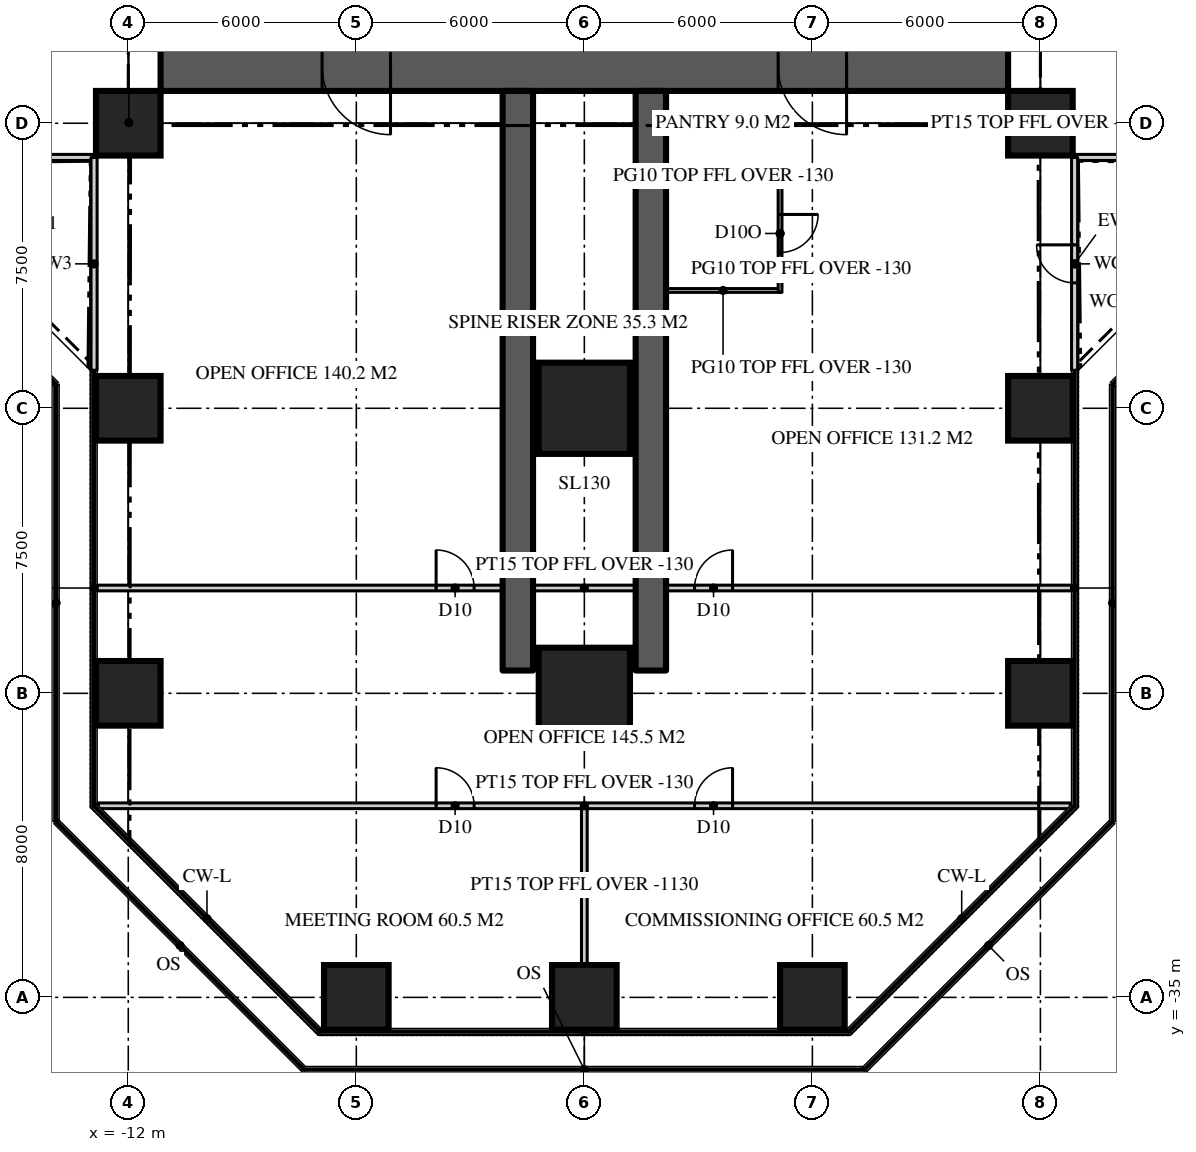
"""IFC4 building model, lengths in metres.
Left out: names, types, materials, properties, quantities, classifications, styles, units other than length and angle.
Written with IfcOpenShell. Run it as: python <this file> out.ifc"""

import sys

from ifc_helpers import new_model, si_unit, direction, frame, frame_2d, origin, origin_2d, place, context, subcontext, project, spatial, rectangle, extrude, element, fill, save


model = new_model("IFC4")
c1 = context("Model", 3, precision=1e-05, world=origin(), true_north=direction((0.0, 1.0)))
c2 = subcontext(c1, "Body", "Model", "MODEL_VIEW")
j1 = project(units=[si_unit("LENGTHUNIT", "METRE"), si_unit("PLANEANGLEUNIT", "RADIAN")], contexts=[c1])
p1 = place(None, origin())
s1 = spatial("IfcSite", under=j1, at=p1, CompositionType="ELEMENT")
p2 = place(p1, origin())
s2 = spatial("IfcBuilding", under=s1, at=p2, CompositionType="ELEMENT")
p3 = place(p2, frame((0.0, 0.0, 82.5)))
s3 = spatial("IfcBuildingStorey", under=s2, at=p3, CompositionType="ELEMENT", Elevation=82.5)
p4 = place(p3, frame((11.15, -10.5, 0.0), z_axis=(0.0, 0.0, 1.0), x_axis=(-1.0, 0.0, 0.0)))
e1 = element("IfcWall", 1, at=p4, inside=s3, PredefinedType="SHEAR", context=c2, shape_type="SweptSolid", body=[
    extrude(rectangle(XDim=22.3, YDim=1.3, at=frame_2d((11.15, 0.0))), origin(), (0.0, 0.0, 1.0), 3.9),
])
p5 = place(p4, frame((16.25, 0.0, 0.0)))
e2 = element("IfcOpeningElement", 2, at=p5, cuts=e1, PredefinedType="OPENING", context=c2, shape_type="SweptSolid", body=[
    extrude(rectangle(XDim=1.8, YDim=2.2, at=frame_2d((0.9, 1.1))), frame((0.0, 0.66, 0.0), z_axis=(0.0, -1.0, 0.0), x_axis=(1.0, 0.0, 0.0)), (0.0, 0.0, 1.0), 1.32),
])
p6 = place(p4, frame((4.25, 0.0, 0.0)))
e3 = element("IfcOpeningElement", 3, at=p6, cuts=e1, PredefinedType="OPENING", context=c2, shape_type="SweptSolid", body=[
    extrude(rectangle(XDim=1.8, YDim=2.2, at=frame_2d((0.9, 1.1))), frame((0.0, 0.66, 0.0), z_axis=(0.0, -1.0, 0.0), x_axis=(1.0, 0.0, 0.0)), (0.0, 0.0, 1.0), 1.32),
])
for number, where, z_axis, x_axis in (
    (4, (-1.75, -11.15, 0.0), (0.0, 0.0, 1.0), (0.0, -1.0, 0.0)),
    (5, (1.75, -11.15, 0.0), (0.0, 0.0, 1.0), (0.0, -1.0, 0.0)),
):
    element("IfcWall", number, at=place(p3, frame(where, z_axis=z_axis, x_axis=x_axis)), inside=s3, PredefinedType="SHEAR", context=c2, shape_type="SweptSolid", body=[
        extrude(rectangle(XDim=15.25, YDim=0.8, at=frame_2d((7.625, 0.0))), origin(), (0.0, 0.0, 1.0), 3.9),
    ])
for number, where, z_axis, x_axis in (
    (6, (-6.0, -35.0, 0.0), (0.0, 0.0, 1.0), (1.0, 0.0, 0.0)),
    (7, (0.0, -35.0, 0.0), (0.0, 0.0, 1.0), (1.0, 0.0, 0.0)),
    (8, (6.0, -35.0, 0.0), (0.0, 0.0, 1.0), (1.0, 0.0, 0.0)),
    (9, (-12.0, -27.0, 0.0), (0.0, 0.0, 1.0), (1.0, 0.0, 0.0)),
):
    element("IfcColumn", number, at=place(p3, frame(where, z_axis=z_axis, x_axis=x_axis)), inside=s3, PredefinedType="COLUMN", context=c2, shape_type="SweptSolid", body=[
        extrude(rectangle(XDim=1.7, YDim=1.7, at=origin_2d()), origin(), (0.0, 0.0, 1.0), 3.9),
    ])
p7 = place(p3, frame((0.0, -27.0, 0.0), z_axis=(0.0, 0.0, 1.0), x_axis=(1.0, 0.0, 0.0)))
e10 = element("IfcColumn", 10, at=p7, inside=s3, PredefinedType="COLUMN", context=c2, shape_type="SweptSolid", body=[
    extrude(rectangle(XDim=2.4, YDim=2.4, at=origin_2d()), origin(), (0.0, 0.0, 1.0), 3.9),
])
for number, where, z_axis, x_axis in (
    (11, (12.0, -27.0, 0.0), (0.0, 0.0, 1.0), (1.0, 0.0, 0.0)),
    (12, (-12.0, -19.5, 0.0), (0.0, 0.0, 1.0), (1.0, 0.0, 0.0)),
):
    element("IfcColumn", number, at=place(p3, frame(where, z_axis=z_axis, x_axis=x_axis)), inside=s3, PredefinedType="COLUMN", context=c2, shape_type="SweptSolid", body=[
        extrude(rectangle(XDim=1.7, YDim=1.7, at=origin_2d()), origin(), (0.0, 0.0, 1.0), 3.9),
    ])
p8 = place(p3, frame((0.0, -19.5, 0.0), z_axis=(0.0, 0.0, 1.0), x_axis=(1.0, 0.0, 0.0)))
e13 = element("IfcColumn", 13, at=p8, inside=s3, PredefinedType="COLUMN", context=c2, shape_type="SweptSolid", body=[
    extrude(rectangle(XDim=2.4, YDim=2.4, at=origin_2d()), origin(), (0.0, 0.0, 1.0), 3.9),
])
for number, where, z_axis, x_axis in (
    (14, (12.0, -19.5, 0.0), (0.0, 0.0, 1.0), (1.0, 0.0, 0.0)),
    (15, (-12.0, -12.0, 0.0), (0.0, 0.0, 1.0), (1.0, 0.0, 0.0)),
    (16, (12.0, -12.0, 0.0), (0.0, 0.0, 1.0), (1.0, 0.0, 0.0)),
):
    element("IfcColumn", number, at=place(p3, frame(where, z_axis=z_axis, x_axis=x_axis)), inside=s3, PredefinedType="COLUMN", context=c2, shape_type="SweptSolid", body=[
        extrude(rectangle(XDim=1.7, YDim=1.7, at=origin_2d()), origin(), (0.0, 0.0, 1.0), 3.9),
    ])
p9 = place(p3, frame((12.9, -12.9, 0.0), z_axis=(0.0, 0.0, 1.0), x_axis=(1.0, 0.0, 0.0)))
e17 = element("IfcWall", 17, at=p9, inside=s3, PredefinedType="SOLIDWALL", context=c2, shape_type="SweptSolid", body=[
    extrude(rectangle(XDim=5.6, YDim=0.16, at=frame_2d((2.8, 0.0))), origin(), (0.0, 0.0, 1.0), 3.77),
])
p10 = place(p3, frame((-18.5, -12.9, 0.0), z_axis=(0.0, 0.0, 1.0), x_axis=(1.0, 0.0, 0.0)))
e18 = element("IfcWall", 18, at=p10, inside=s3, PredefinedType="SOLIDWALL", context=c2, shape_type="SweptSolid", body=[
    extrude(rectangle(XDim=5.6, YDim=0.16, at=frame_2d((2.8, 0.0))), origin(), (0.0, 0.0, 1.0), 3.77),
])
p11 = place(p10, frame((2.3, 0.0, 0.0)))
e19 = element("IfcOpeningElement", 19, at=p11, cuts=e18, PredefinedType="OPENING", context=c2, shape_type="SweptSolid", body=[
    extrude(rectangle(XDim=1.0, YDim=2.2, at=frame_2d((0.5, 1.1))), frame((0.0, 0.09, 0.0), z_axis=(0.0, -1.0, 0.0), x_axis=(1.0, 0.0, 0.0)), (0.0, 0.0, 1.0), 0.18),
])
p12 = place(p3, frame((-12.9, -12.9, 0.0), z_axis=(0.0, 0.0, 1.0), x_axis=(0.0, -1.0, 0.0)))
e20 = element("IfcWall", 20, at=p12, inside=s3, PredefinedType="SOLIDWALL", context=c2, shape_type="SweptSolid", body=[
    extrude(rectangle(XDim=5.6, YDim=0.16, at=frame_2d((2.8, 0.0))), origin(), (0.0, 0.0, 1.0), 3.77),
])
p13 = place(p3, frame((12.9, -18.5, 0.0), z_axis=(0.0, 0.0, 1.0), x_axis=(0.0, 1.0, 0.0)))
e21 = element("IfcWall", 21, at=p13, inside=s3, PredefinedType="SOLIDWALL", context=c2, shape_type="SweptSolid", body=[
    extrude(rectangle(XDim=5.6, YDim=0.16, at=frame_2d((2.8, 0.0))), origin(), (0.0, 0.0, 1.0), 3.77),
])
p14 = place(p13, frame((2.3, 0.0, 0.0)))
e22 = element("IfcOpeningElement", 22, at=p14, cuts=e21, PredefinedType="OPENING", context=c2, shape_type="SweptSolid", body=[
    extrude(rectangle(XDim=1.0, YDim=2.2, at=frame_2d((0.5, 1.1))), frame((0.0, 0.09, 0.0), z_axis=(0.0, -1.0, 0.0), x_axis=(1.0, 0.0, 0.0)), (0.0, 0.0, 1.0), 0.18),
])
p15 = place(p3, frame((-12.82, -24.229, 0.0), z_axis=(0.0, 0.0, 1.0), x_axis=(1.0, 0.0, 0.0)))
e23 = element("IfcWall", 23, at=p15, inside=s3, PredefinedType="PARTITIONING", context=c2, shape_type="SweptSolid", body=[
    extrude(rectangle(XDim=25.64, YDim=0.15, at=frame_2d((12.82, 0.0))), origin(), (0.0, 0.0, 1.0), 3.77),
])
p16 = place(p15, frame((15.72, 0.0, 0.0)))
e24 = element("IfcOpeningElement", 24, at=p16, cuts=e23, PredefinedType="OPENING", context=c2, shape_type="SweptSolid", body=[
    extrude(rectangle(XDim=1.0, YDim=2.2, at=frame_2d((0.5, 1.1))), frame((0.0, 0.085, 0.0), z_axis=(0.0, -1.0, 0.0), x_axis=(1.0, 0.0, 0.0)), (0.0, 0.0, 1.0), 0.17),
])
p17 = place(p15, frame((8.92, 0.0, 0.0)))
e25 = element("IfcOpeningElement", 25, at=p17, cuts=e23, PredefinedType="OPENING", context=c2, shape_type="SweptSolid", body=[
    extrude(rectangle(XDim=1.0, YDim=2.2, at=frame_2d((0.5, 1.1))), frame((0.0, 0.085, 0.0), z_axis=(0.0, -1.0, 0.0), x_axis=(1.0, 0.0, 0.0)), (0.0, 0.0, 1.0), 0.17),
])
p18 = place(p3, frame((-12.786, -29.959, 0.0), z_axis=(0.0, 0.0, 1.0), x_axis=(1.0, 0.0, 0.0)))
e26 = element("IfcWall", 26, at=p18, inside=s3, PredefinedType="PARTITIONING", context=c2, shape_type="SweptSolid", body=[
    extrude(rectangle(XDim=25.573, YDim=0.15, at=frame_2d((12.786, 0.0))), origin(), (0.0, 0.0, 1.0), 3.77),
])
p19 = place(p18, frame((15.687, 0.0, 0.0)))
e27 = element("IfcOpeningElement", 27, at=p19, cuts=e26, PredefinedType="OPENING", context=c2, shape_type="SweptSolid", body=[
    extrude(rectangle(XDim=1.0, YDim=2.2, at=frame_2d((0.5, 1.1))), frame((0.0, 0.085, 0.0), z_axis=(0.0, -1.0, 0.0), x_axis=(1.0, 0.0, 0.0)), (0.0, 0.0, 1.0), 0.17),
])
p20 = place(p18, frame((8.886, 0.0, 0.0)))
e28 = element("IfcOpeningElement", 28, at=p20, cuts=e26, PredefinedType="OPENING", context=c2, shape_type="SweptSolid", body=[
    extrude(rectangle(XDim=1.0, YDim=2.2, at=frame_2d((0.5, 1.1))), frame((0.0, 0.085, 0.0), z_axis=(0.0, -1.0, 0.0), x_axis=(1.0, 0.0, 0.0)), (0.0, 0.0, 1.0), 0.17),
])
p21 = place(p3, frame((0.0, -29.959, 0.0), z_axis=(0.0, 0.0, 1.0), x_axis=(0.0, -1.0, 0.0)))
e29 = element("IfcWall", 29, at=p21, inside=s3, PredefinedType="PARTITIONING", context=c2, shape_type="SweptSolid", body=[
    extrude(rectangle(XDim=4.191, YDim=0.15, at=frame_2d((2.095, 0.0))), origin(), (0.0, 0.0, 1.0), 2.77),
])
for number, where, z_axis, x_axis in (
    (30, (2.15, -13.4, 0.0), (0.0, 0.0, 1.0), (1.0, 0.0, 0.0)),
    (31, (2.15, -16.4, 0.0), (0.0, 0.0, 1.0), (1.0, 0.0, 0.0)),
):
    element("IfcWall", number, at=place(p3, frame(where, z_axis=z_axis, x_axis=x_axis)), inside=s3, PredefinedType="PARTITIONING", context=c2, shape_type="SweptSolid", body=[
        extrude(rectangle(XDim=3.0, YDim=0.1, at=frame_2d((1.5, 0.0))), origin(), (0.0, 0.0, 1.0), 3.77),
    ])
p22 = place(p3, frame((5.15, -13.35, 0.0), z_axis=(0.0, 0.0, 1.0), x_axis=(0.0, -1.0, 0.0)))
e32 = element("IfcWall", 32, at=p22, inside=s3, PredefinedType="PARTITIONING", context=c2, shape_type="SweptSolid", body=[
    extrude(rectangle(XDim=3.1, YDim=0.1, at=frame_2d((1.55, 0.0))), origin(), (0.0, 0.0, 1.0), 3.77),
])
p23 = place(p22, frame((1.05, 0.0, 0.0)))
e33 = element("IfcOpeningElement", 33, at=p23, cuts=e32, PredefinedType="OPENING", context=c2, shape_type="SweptSolid", body=[
    extrude(rectangle(XDim=1.0, YDim=2.2, at=frame_2d((0.5, 1.1))), frame((0.0, 0.06, 0.0), z_axis=(0.0, -1.0, 0.0), x_axis=(1.0, 0.0, 0.0)), (0.0, 0.0, 1.0), 0.12),
])
for number, where, z_axis, x_axis in (
    (34, (-11.15, -11.15, 0.0), (0.0, 0.0, 1.0), (-0.707, -0.707, 0.0)),
    (35, (11.15, -11.15, 0.0), (0.0, 0.0, 1.0), (0.707, -0.707, 0.0)),
):
    element("IfcWall", number, at=place(p3, frame(where, z_axis=z_axis, x_axis=x_axis)), inside=s3, PredefinedType="PARTITIONING", context=c2, shape_type="SweptSolid", body=[
        extrude(rectangle(XDim=2.362, YDim=0.15, at=frame_2d((1.181, 0.0))), origin(), (0.0, 0.0, 1.0), 3.22),
    ])
p24 = place(p14, origin())
e36 = element("IfcDoor", 36, at=p24, inside=s3, OperationType="SINGLE_SWING_RIGHT", PredefinedType="DOOR", context=c2, shape_type="SweptSolid", body=[
    extrude(rectangle(XDim=1.0, YDim=2.2, at=frame_2d((0.5, 1.1))), frame((0.0, 0.025, 0.0), z_axis=(0.0, -1.0, 0.0), x_axis=(1.0, 0.0, 0.0)), (0.0, 0.0, 1.0), 0.05),
])
fill(e22, e36)
p25 = place(p5, origin())
e37 = element("IfcDoor", 37, at=p25, inside=s3, OperationType="DOUBLE_DOOR_DOUBLE_SWING", PredefinedType="DOOR", context=c2, shape_type="SweptSolid", body=[
    extrude(rectangle(XDim=1.8, YDim=2.2, at=frame_2d((0.9, 1.1))), frame((0.0, 0.025, 0.0), z_axis=(0.0, -1.0, 0.0), x_axis=(1.0, 0.0, 0.0)), (0.0, 0.0, 1.0), 0.05),
])
fill(e2, e37)
p26 = place(p6, origin())
e38 = element("IfcDoor", 38, at=p26, inside=s3, OperationType="DOUBLE_DOOR_DOUBLE_SWING", PredefinedType="DOOR", context=c2, shape_type="SweptSolid", body=[
    extrude(rectangle(XDim=1.8, YDim=2.2, at=frame_2d((0.9, 1.1))), frame((0.0, 0.025, 0.0), z_axis=(0.0, -1.0, 0.0), x_axis=(1.0, 0.0, 0.0)), (0.0, 0.0, 1.0), 0.05),
])
fill(e3, e38)
p27 = place(p16, origin())
e39 = element("IfcDoor", 39, at=p27, inside=s3, OperationType="SINGLE_SWING_RIGHT", PredefinedType="DOOR", context=c2, shape_type="SweptSolid", body=[
    extrude(rectangle(XDim=1.0, YDim=2.2, at=frame_2d((0.5, 1.1))), frame((0.0, 0.025, 0.0), z_axis=(0.0, -1.0, 0.0), x_axis=(1.0, 0.0, 0.0)), (0.0, 0.0, 1.0), 0.05),
])
fill(e24, e39)
p28 = place(p17, origin())
e40 = element("IfcDoor", 40, at=p28, inside=s3, OperationType="SINGLE_SWING_LEFT", PredefinedType="DOOR", context=c2, shape_type="SweptSolid", body=[
    extrude(rectangle(XDim=1.0, YDim=2.2, at=frame_2d((0.5, 1.1))), frame((0.0, 0.025, 0.0), z_axis=(0.0, -1.0, 0.0), x_axis=(1.0, 0.0, 0.0)), (0.0, 0.0, 1.0), 0.05),
])
fill(e25, e40)
p29 = place(p19, origin())
e41 = element("IfcDoor", 41, at=p29, inside=s3, OperationType="SINGLE_SWING_RIGHT", PredefinedType="DOOR", context=c2, shape_type="SweptSolid", body=[
    extrude(rectangle(XDim=1.0, YDim=2.2, at=frame_2d((0.5, 1.1))), frame((0.0, 0.025, 0.0), z_axis=(0.0, -1.0, 0.0), x_axis=(1.0, 0.0, 0.0)), (0.0, 0.0, 1.0), 0.05),
])
fill(e27, e41)
p30 = place(p20, origin())
e42 = element("IfcDoor", 42, at=p30, inside=s3, OperationType="SINGLE_SWING_LEFT", PredefinedType="DOOR", context=c2, shape_type="SweptSolid", body=[
    extrude(rectangle(XDim=1.0, YDim=2.2, at=frame_2d((0.5, 1.1))), frame((0.0, 0.025, 0.0), z_axis=(0.0, -1.0, 0.0), x_axis=(1.0, 0.0, 0.0)), (0.0, 0.0, 1.0), 0.05),
])
fill(e28, e42)
p31 = place(p23, origin())
e43 = element("IfcDoor", 43, at=p31, inside=s3, OperationType="SINGLE_SWING_LEFT", PredefinedType="DOOR", context=c2, shape_type="SweptSolid", body=[
    extrude(rectangle(XDim=1.0, YDim=2.2, at=frame_2d((0.5, 1.1))), frame((0.0, 0.025, 0.0), z_axis=(0.0, -1.0, 0.0), x_axis=(1.0, 0.0, 0.0)), (0.0, 0.0, 1.0), 0.05),
])
fill(e33, e43)
save(model, sys.argv[1])
